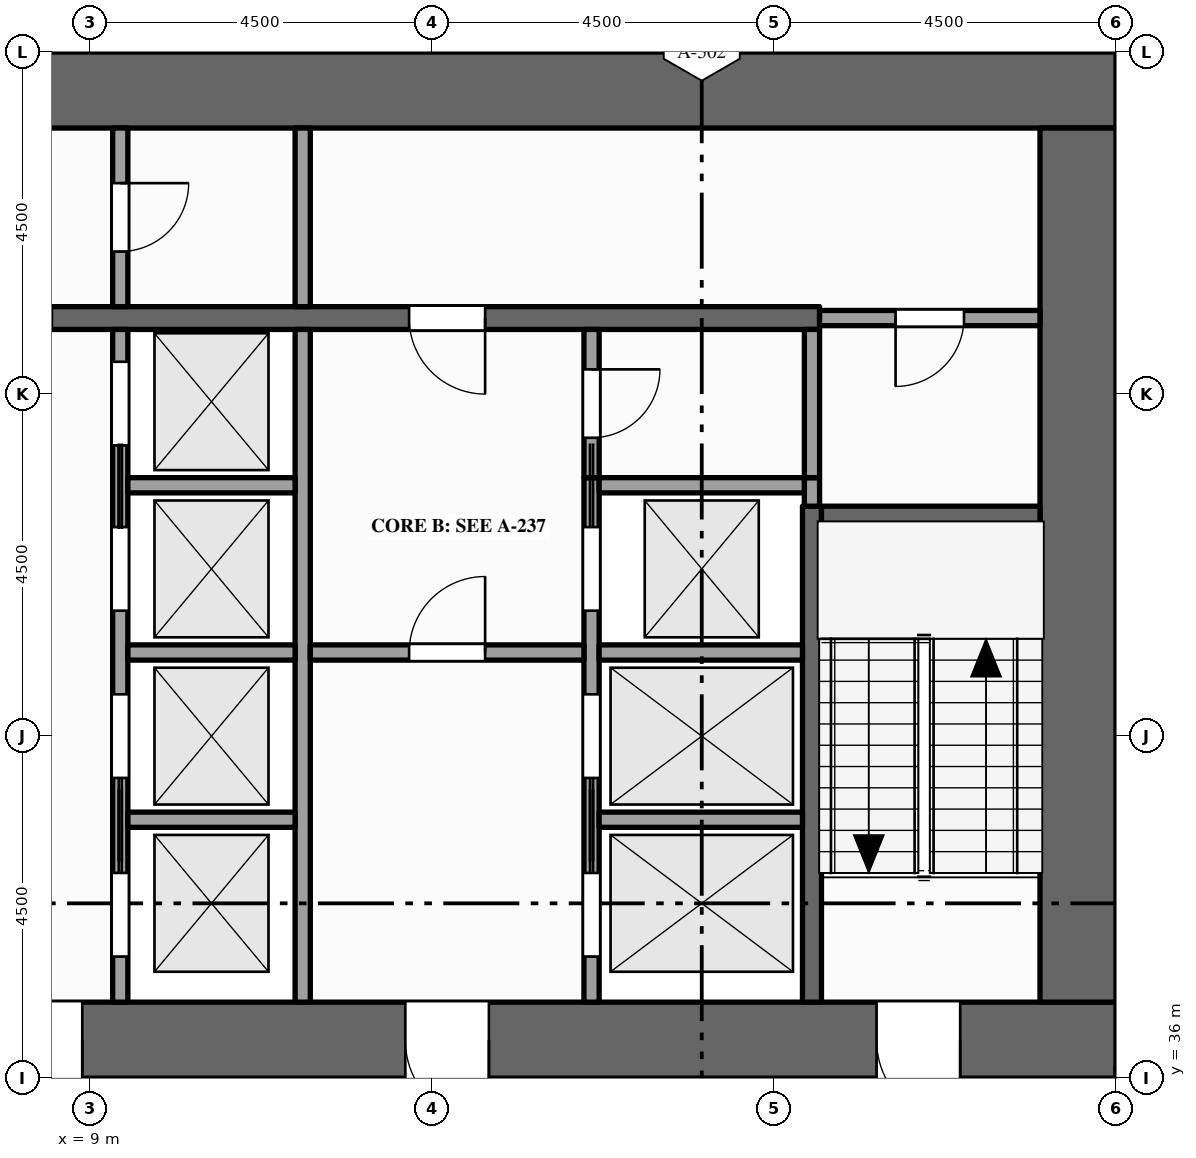
"""IFC4 building model, lengths in metres.
Left out: names, types, materials, properties, quantities, classifications, styles, units other than length and angle.
Written with IfcOpenShell. Run it as: python <this file> out.ifc"""

import sys

from ifc_helpers import new_model, si_unit, direction, frame, frame_2d, origin, place, context, subcontext, project, spatial, rectangle, extrude, element, fill, save


model = new_model("IFC4")
c1 = context("Model", 3, precision=1e-05, world=origin(), true_north=direction((0.0, 1.0)))
c2 = subcontext(c1, "Body", "Model", "MODEL_VIEW")
j1 = project(units=[si_unit("LENGTHUNIT", "METRE"), si_unit("PLANEANGLEUNIT", "RADIAN")], contexts=[c1])
p1 = place(None, origin())
s1 = spatial("IfcSite", under=j1, at=p1, CompositionType="ELEMENT")
p2 = place(p1, origin())
s2 = spatial("IfcBuilding", under=s1, at=p2, CompositionType="ELEMENT")
p3 = place(p2, frame((0.0, 0.0, 207.0)))
s3 = spatial("IfcBuildingStorey", under=s2, at=p3, CompositionType="ELEMENT", Elevation=207.0)
p4 = place(p3, frame((0.0, 36.5, -0.15), z_axis=(0.0, 0.0, 1.0), x_axis=(1.0, 0.0, 0.0)))
e1 = element("IfcWall", 1, at=p4, inside=s3, PredefinedType="SHEAR", context=c2, shape_type="SweptSolid", body=[
    extrude(rectangle(XDim=22.5, YDim=1.0, at=frame_2d((11.25, 0.0))), origin(), (0.0, 0.0, 1.0), 4.0),
])
p5 = place(p4, frame((7.1, 0.0, 0.15)))
e2 = element("IfcOpeningElement", 2, at=p5, cuts=e1, PredefinedType="OPENING", context=c2, shape_type="SweptSolid", body=[
    extrude(rectangle(XDim=1.8, YDim=2.1, at=frame_2d((0.9, 1.05))), frame((0.0, 0.51, 0.0), z_axis=(0.0, -1.0, 0.0), x_axis=(1.0, 0.0, 0.0)), (0.0, 0.0, 1.0), 1.02),
])
p6 = place(p4, frame((13.15, 0.0, 0.15)))
e3 = element("IfcOpeningElement", 3, at=p6, cuts=e1, PredefinedType="OPENING", context=c2, shape_type="SweptSolid", body=[
    extrude(rectangle(XDim=1.1, YDim=2.1, at=frame_2d((0.55, 1.05))), frame((0.0, 0.51, 0.0), z_axis=(0.0, -1.0, 0.0), x_axis=(1.0, 0.0, 0.0)), (0.0, 0.0, 1.0), 1.02),
])
p7 = place(p4, frame((2.15, 0.0, 0.15)))
e4 = element("IfcOpeningElement", 4, at=p7, cuts=e1, PredefinedType="OPENING", context=c2, shape_type="SweptSolid", body=[
    extrude(rectangle(XDim=1.1, YDim=2.1, at=frame_2d((0.55, 1.05))), frame((0.0, 0.51, 0.0), z_axis=(0.0, -1.0, 0.0), x_axis=(1.0, 0.0, 0.0)), (0.0, 0.0, 1.0), 1.02),
])
p8 = place(p4, frame((19.35, 0.0, 0.15)))
e5 = element("IfcOpeningElement", 5, at=p8, cuts=e1, PredefinedType="OPENING", context=c2, shape_type="SweptSolid", body=[
    extrude(rectangle(XDim=1.1, YDim=2.1, at=frame_2d((0.55, 1.05))), frame((0.0, 0.51, 0.0), z_axis=(0.0, -1.0, 0.0), x_axis=(1.0, 0.0, 0.0)), (0.0, 0.0, 1.0), 1.02),
])
p9 = place(p3, frame((0.0, 49.0, -0.15), z_axis=(0.0, 0.0, 1.0), x_axis=(1.0, 0.0, 0.0)))
e6 = element("IfcWall", 6, at=p9, inside=s3, PredefinedType="SHEAR", context=c2, shape_type="SweptSolid", body=[
    extrude(rectangle(XDim=22.5, YDim=1.0, at=frame_2d((11.25, 0.0))), origin(), (0.0, 0.0, 1.0), 4.0),
])
p10 = place(p3, frame((22.0, 37.0, -0.15), z_axis=(0.0, 0.0, 1.0), x_axis=(0.0, 1.0, 0.0)))
e7 = element("IfcWall", 7, at=p10, inside=s3, PredefinedType="SHEAR", context=c2, shape_type="SweptSolid", body=[
    extrude(rectangle(XDim=11.5, YDim=1.0, at=frame_2d((5.75, 0.0))), origin(), (0.0, 0.0, 1.0), 4.0),
])
p11 = place(p3, frame((9.4, 37.0, 0.0), z_axis=(0.0, 0.0, 1.0), x_axis=(0.0, 1.0, 0.0)))
e8 = element("IfcWall", 8, at=p11, inside=s3, PredefinedType="SOLIDWALL", context=c2, shape_type="SweptSolid", body=[
    extrude(rectangle(XDim=8.85, YDim=0.2, at=frame_2d((4.425, 0.0))), origin(), (0.0, 0.0, 1.0), 3.85),
])
p12 = place(p11, frame((0.6, 0.0, 0.012)))
e9 = element("IfcOpeningElement", 9, at=p12, cuts=e8, PredefinedType="OPENING", context=c2, shape_type="SweptSolid", body=[
    extrude(rectangle(XDim=1.1, YDim=2.1, at=frame_2d((0.55, 1.05))), frame((0.0, 0.11, 0.0), z_axis=(0.0, -1.0, 0.0), x_axis=(1.0, 0.0, 0.0)), (0.0, 0.0, 1.0), 0.22),
])
p13 = place(p11, frame((2.95, 0.0, 0.012)))
e10 = element("IfcOpeningElement", 10, at=p13, cuts=e8, PredefinedType="OPENING", context=c2, shape_type="SweptSolid", body=[
    extrude(rectangle(XDim=1.1, YDim=2.1, at=frame_2d((0.55, 1.05))), frame((0.0, 0.11, 0.0), z_axis=(0.0, -1.0, 0.0), x_axis=(1.0, 0.0, 0.0)), (0.0, 0.0, 1.0), 0.22),
])
p14 = place(p11, frame((5.15, 0.0, 0.012)))
e11 = element("IfcOpeningElement", 11, at=p14, cuts=e8, PredefinedType="OPENING", context=c2, shape_type="SweptSolid", body=[
    extrude(rectangle(XDim=1.1, YDim=2.1, at=frame_2d((0.55, 1.05))), frame((0.0, 0.11, 0.0), z_axis=(0.0, -1.0, 0.0), x_axis=(1.0, 0.0, 0.0)), (0.0, 0.0, 1.0), 0.22),
])
p15 = place(p11, frame((7.325, 0.0, 0.012)))
e12 = element("IfcOpeningElement", 12, at=p15, cuts=e8, PredefinedType="OPENING", context=c2, shape_type="SweptSolid", body=[
    extrude(rectangle(XDim=1.1, YDim=2.1, at=frame_2d((0.55, 1.05))), frame((0.0, 0.11, 0.0), z_axis=(0.0, -1.0, 0.0), x_axis=(1.0, 0.0, 0.0)), (0.0, 0.0, 1.0), 0.22),
])
p16 = place(p3, frame((9.4, 46.15, 0.0), z_axis=(0.0, 0.0, 1.0), x_axis=(0.0, 1.0, 0.0)))
e13 = element("IfcWall", 13, at=p16, inside=s3, PredefinedType="PARTITIONING", context=c2, shape_type="SweptSolid", body=[
    extrude(rectangle(XDim=2.35, YDim=0.2, at=frame_2d((1.175, 0.0))), origin(), (0.0, 0.0, 1.0), 3.85),
])
p17 = place(p16, frame((0.725, 0.0, 0.0)))
e14 = element("IfcOpeningElement", 14, at=p17, cuts=e13, PredefinedType="OPENING", context=c2, shape_type="SweptSolid", body=[
    extrude(rectangle(XDim=0.9, YDim=2.1, at=frame_2d((0.45, 1.05))), frame((0.0, 0.11, 0.0), z_axis=(0.0, -1.0, 0.0), x_axis=(1.0, 0.0, 0.0)), (0.0, 0.0, 1.0), 0.22),
])
p18 = place(p3, frame((11.8, 37.0, 0.0), z_axis=(0.0, 0.0, 1.0), x_axis=(0.0, 1.0, 0.0)))
e15 = element("IfcWall", 15, at=p18, inside=s3, PredefinedType="SOLIDWALL", context=c2, shape_type="SweptSolid", body=[
    extrude(rectangle(XDim=8.85, YDim=0.2, at=frame_2d((4.425, 0.0))), origin(), (0.0, 0.0, 1.0), 3.85),
])
p19 = place(p3, frame((11.8, 46.15, 0.0), z_axis=(0.0, 0.0, 1.0), x_axis=(0.0, 1.0, 0.0)))
e16 = element("IfcWall", 16, at=p19, inside=s3, PredefinedType="PARTITIONING", context=c2, shape_type="SweptSolid", body=[
    extrude(rectangle(XDim=2.35, YDim=0.2, at=frame_2d((1.175, 0.0))), origin(), (0.0, 0.0, 1.0), 3.85),
])
p20 = place(p3, frame((15.6, 37.0, 0.0), z_axis=(0.0, 0.0, 1.0), x_axis=(0.0, 1.0, 0.0)))
e17 = element("IfcWall", 17, at=p20, inside=s3, PredefinedType="SOLIDWALL", context=c2, shape_type="SweptSolid", body=[
    extrude(rectangle(XDim=6.9, YDim=0.2, at=frame_2d((3.45, 0.0))), origin(), (0.0, 0.0, 1.0), 3.85),
])
p21 = place(p20, frame((0.6, 0.0, 0.012)))
e18 = element("IfcOpeningElement", 18, at=p21, cuts=e17, PredefinedType="OPENING", context=c2, shape_type="SweptSolid", body=[
    extrude(rectangle(XDim=1.1, YDim=2.1, at=frame_2d((0.55, 1.05))), frame((0.0, 0.11, 0.0), z_axis=(0.0, -1.0, 0.0), x_axis=(1.0, 0.0, 0.0)), (0.0, 0.0, 1.0), 0.22),
])
p22 = place(p20, frame((2.95, 0.0, 0.012)))
e19 = element("IfcOpeningElement", 19, at=p22, cuts=e17, PredefinedType="OPENING", context=c2, shape_type="SweptSolid", body=[
    extrude(rectangle(XDim=1.1, YDim=2.1, at=frame_2d((0.55, 1.05))), frame((0.0, 0.11, 0.0), z_axis=(0.0, -1.0, 0.0), x_axis=(1.0, 0.0, 0.0)), (0.0, 0.0, 1.0), 0.22),
])
p23 = place(p20, frame((5.15, 0.0, 0.012)))
e20 = element("IfcOpeningElement", 20, at=p23, cuts=e17, PredefinedType="OPENING", context=c2, shape_type="SweptSolid", body=[
    extrude(rectangle(XDim=1.1, YDim=2.1, at=frame_2d((0.55, 1.05))), frame((0.0, 0.11, 0.0), z_axis=(0.0, -1.0, 0.0), x_axis=(1.0, 0.0, 0.0)), (0.0, 0.0, 1.0), 0.22),
])
p24 = place(p3, frame((15.6, 43.9, 0.0), z_axis=(0.0, 0.0, 1.0), x_axis=(0.0, 1.0, 0.0)))
e21 = element("IfcWall", 21, at=p24, inside=s3, PredefinedType="PARTITIONING", context=c2, shape_type="SweptSolid", body=[
    extrude(rectangle(XDim=1.95, YDim=0.2, at=frame_2d((0.975, 0.0))), origin(), (0.0, 0.0, 1.0), 3.85),
])
p25 = place(p24, frame((0.525, 0.0, 0.0)))
e22 = element("IfcOpeningElement", 22, at=p25, cuts=e21, PredefinedType="OPENING", context=c2, shape_type="SweptSolid", body=[
    extrude(rectangle(XDim=0.9, YDim=2.1, at=frame_2d((0.45, 1.05))), frame((0.0, 0.11, 0.0), z_axis=(0.0, -1.0, 0.0), x_axis=(1.0, 0.0, 0.0)), (0.0, 0.0, 1.0), 0.22),
])
p26 = place(p3, frame((18.5, 37.0, 0.0), z_axis=(0.0, 0.0, 1.0), x_axis=(0.0, 1.0, 0.0)))
e23 = element("IfcWall", 23, at=p26, inside=s3, PredefinedType="SHEAR", context=c2, shape_type="SweptSolid", body=[
    extrude(rectangle(XDim=6.525, YDim=0.25, at=frame_2d((3.262, 0.0))), origin(), (0.0, 0.0, 1.0), 3.85),
])
p27 = place(p3, frame((18.5, 43.525, 0.0), z_axis=(0.0, 0.0, 1.0), x_axis=(0.0, 1.0, 0.0)))
e24 = element("IfcWall", 24, at=p27, inside=s3, PredefinedType="SOLIDWALL", context=c2, shape_type="SweptSolid", body=[
    extrude(rectangle(XDim=0.375, YDim=0.2, at=frame_2d((0.188, 0.0))), origin(), (0.0, 0.0, 1.0), 3.85),
])
p28 = place(p3, frame((18.5, 43.9, 0.0), z_axis=(0.0, 0.0, 1.0), x_axis=(0.0, 1.0, 0.0)))
e25 = element("IfcWall", 25, at=p28, inside=s3, PredefinedType="PARTITIONING", context=c2, shape_type="SweptSolid", body=[
    extrude(rectangle(XDim=1.95, YDim=0.2, at=frame_2d((0.975, 0.0))), origin(), (0.0, 0.0, 1.0), 3.85),
])
p29 = place(p3, frame((9.5, 39.4, 0.0), z_axis=(0.0, 0.0, 1.0), x_axis=(1.0, 0.0, 0.0)))
e26 = element("IfcWall", 26, at=p29, inside=s3, PredefinedType="SOLIDWALL", context=c2, shape_type="SweptSolid", body=[
    extrude(rectangle(XDim=2.2, YDim=0.2, at=frame_2d((1.1, 0.0))), origin(), (0.0, 0.0, 1.0), 3.85),
])
p30 = place(p3, frame((15.7, 39.4, 0.0), z_axis=(0.0, 0.0, 1.0), x_axis=(1.0, 0.0, 0.0)))
e27 = element("IfcWall", 27, at=p30, inside=s3, PredefinedType="SOLIDWALL", context=c2, shape_type="SweptSolid", body=[
    extrude(rectangle(XDim=2.675, YDim=0.2, at=frame_2d((1.337, 0.0))), origin(), (0.0, 0.0, 1.0), 3.85),
])
p31 = place(p3, frame((9.5, 41.6, 0.0), z_axis=(0.0, 0.0, 1.0), x_axis=(1.0, 0.0, 0.0)))
e28 = element("IfcWall", 28, at=p31, inside=s3, PredefinedType="SOLIDWALL", context=c2, shape_type="SweptSolid", body=[
    extrude(rectangle(XDim=2.2, YDim=0.2, at=frame_2d((1.1, 0.0))), origin(), (0.0, 0.0, 1.0), 3.85),
])
p32 = place(p3, frame((11.9, 41.6, 0.0), z_axis=(0.0, 0.0, 1.0), x_axis=(1.0, 0.0, 0.0)))
e29 = element("IfcWall", 29, at=p32, inside=s3, PredefinedType="PARTITIONING", context=c2, shape_type="SweptSolid", body=[
    extrude(rectangle(XDim=3.6, YDim=0.2, at=frame_2d((1.8, 0.0))), origin(), (0.0, 0.0, 1.0), 3.85),
])
p33 = place(p32, frame((1.3, 0.0, 0.0)))
e30 = element("IfcOpeningElement", 30, at=p33, cuts=e29, PredefinedType="OPENING", context=c2, shape_type="SweptSolid", body=[
    extrude(rectangle(XDim=1.0, YDim=2.1, at=frame_2d((0.5, 1.05))), frame((0.0, 0.11, 0.0), z_axis=(0.0, -1.0, 0.0), x_axis=(1.0, 0.0, 0.0)), (0.0, 0.0, 1.0), 0.22),
])
p34 = place(p3, frame((15.7, 41.6, 0.0), z_axis=(0.0, 0.0, 1.0), x_axis=(1.0, 0.0, 0.0)))
e31 = element("IfcWall", 31, at=p34, inside=s3, PredefinedType="SOLIDWALL", context=c2, shape_type="SweptSolid", body=[
    extrude(rectangle(XDim=2.675, YDim=0.2, at=frame_2d((1.337, 0.0))), origin(), (0.0, 0.0, 1.0), 3.85),
])
p35 = place(p3, frame((18.625, 43.4, 0.0), z_axis=(0.0, 0.0, 1.0), x_axis=(1.0, 0.0, 0.0)))
e32 = element("IfcWall", 32, at=p35, inside=s3, PredefinedType="SHEAR", context=c2, shape_type="SweptSolid", body=[
    extrude(rectangle(XDim=2.875, YDim=0.25, at=frame_2d((1.438, 0.0))), origin(), (0.0, 0.0, 1.0), 3.85),
])
p36 = place(p3, frame((9.5, 43.8, 0.0), z_axis=(0.0, 0.0, 1.0), x_axis=(1.0, 0.0, 0.0)))
e33 = element("IfcWall", 33, at=p36, inside=s3, PredefinedType="SOLIDWALL", context=c2, shape_type="SweptSolid", body=[
    extrude(rectangle(XDim=2.2, YDim=0.2, at=frame_2d((1.1, 0.0))), origin(), (0.0, 0.0, 1.0), 3.85),
])
p37 = place(p3, frame((15.7, 43.8, 0.0), z_axis=(0.0, 0.0, 1.0), x_axis=(1.0, 0.0, 0.0)))
e34 = element("IfcWall", 34, at=p37, inside=s3, PredefinedType="SOLIDWALL", context=c2, shape_type="SweptSolid", body=[
    extrude(rectangle(XDim=2.7, YDim=0.2, at=frame_2d((1.35, 0.0))), origin(), (0.0, 0.0, 1.0), 3.85),
])
p38 = place(p3, frame((4.1, 46.0, 0.0), z_axis=(0.0, 0.0, 1.0), x_axis=(1.0, 0.0, 0.0)))
e35 = element("IfcWall", 35, at=p38, inside=s3, PredefinedType="SHEAR", context=c2, shape_type="SweptSolid", body=[
    extrude(rectangle(XDim=14.5, YDim=0.3, at=frame_2d((7.25, 0.0))), origin(), (0.0, 0.0, 1.0), 3.85),
])
p39 = place(p38, frame((3.4, 0.0, 0.0)))
e36 = element("IfcOpeningElement", 36, at=p39, cuts=e35, PredefinedType="OPENING", context=c2, shape_type="SweptSolid", body=[
    extrude(rectangle(XDim=1.0, YDim=2.1, at=frame_2d((0.5, 1.05))), frame((0.0, 0.16, 0.0), z_axis=(0.0, -1.0, 0.0), x_axis=(1.0, 0.0, 0.0)), (0.0, 0.0, 1.0), 0.32),
])
p40 = place(p38, frame((9.1, 0.0, 0.0)))
e37 = element("IfcOpeningElement", 37, at=p40, cuts=e35, PredefinedType="OPENING", context=c2, shape_type="SweptSolid", body=[
    extrude(rectangle(XDim=1.0, YDim=2.1, at=frame_2d((0.5, 1.05))), frame((0.0, 0.16, 0.0), z_axis=(0.0, -1.0, 0.0), x_axis=(1.0, 0.0, 0.0)), (0.0, 0.0, 1.0), 0.32),
])
p41 = place(p3, frame((18.6, 46.0, 0.0), z_axis=(0.0, 0.0, 1.0), x_axis=(1.0, 0.0, 0.0)))
e38 = element("IfcWall", 38, at=p41, inside=s3, PredefinedType="PARTITIONING", context=c2, shape_type="SweptSolid", body=[
    extrude(rectangle(XDim=2.9, YDim=0.2, at=frame_2d((1.45, 0.0))), origin(), (0.0, 0.0, 1.0), 3.85),
])
p42 = place(p41, frame((1.0, 0.0, 0.0)))
e39 = element("IfcOpeningElement", 39, at=p42, cuts=e38, PredefinedType="OPENING", context=c2, shape_type="SweptSolid", body=[
    extrude(rectangle(XDim=0.9, YDim=2.1, at=frame_2d((0.45, 1.05))), frame((0.0, 0.11, 0.0), z_axis=(0.0, -1.0, 0.0), x_axis=(1.0, 0.0, 0.0)), (0.0, 0.0, 1.0), 0.22),
])
p43 = place(p12, origin())
e40 = element("IfcDoor", 40, at=p43, inside=s3, OperationType="SLIDING_TO_RIGHT", PredefinedType="DOOR", context=c2, shape_type="SweptSolid", body=[
    extrude(rectangle(XDim=1.1, YDim=2.1, at=frame_2d((0.55, 1.05))), frame((0.0, 0.025, 0.0), z_axis=(0.0, -1.0, 0.0), x_axis=(1.0, 0.0, 0.0)), (0.0, 0.0, 1.0), 0.05),
])
fill(e9, e40)
p44 = place(p13, origin())
e41 = element("IfcDoor", 41, at=p44, inside=s3, OperationType="SLIDING_TO_LEFT", PredefinedType="DOOR", context=c2, shape_type="SweptSolid", body=[
    extrude(rectangle(XDim=1.1, YDim=2.1, at=frame_2d((0.55, 1.05))), frame((0.0, 0.025, 0.0), z_axis=(0.0, -1.0, 0.0), x_axis=(1.0, 0.0, 0.0)), (0.0, 0.0, 1.0), 0.05),
])
fill(e10, e41)
p45 = place(p14, origin())
e42 = element("IfcDoor", 42, at=p45, inside=s3, OperationType="SLIDING_TO_RIGHT", PredefinedType="DOOR", context=c2, shape_type="SweptSolid", body=[
    extrude(rectangle(XDim=1.1, YDim=2.1, at=frame_2d((0.55, 1.05))), frame((0.0, 0.025, 0.0), z_axis=(0.0, -1.0, 0.0), x_axis=(1.0, 0.0, 0.0)), (0.0, 0.0, 1.0), 0.05),
])
fill(e11, e42)
p46 = place(p15, origin())
e43 = element("IfcDoor", 43, at=p46, inside=s3, OperationType="SLIDING_TO_LEFT", PredefinedType="DOOR", context=c2, shape_type="SweptSolid", body=[
    extrude(rectangle(XDim=1.1, YDim=2.1, at=frame_2d((0.55, 1.05))), frame((0.0, 0.025, 0.0), z_axis=(0.0, -1.0, 0.0), x_axis=(1.0, 0.0, 0.0)), (0.0, 0.0, 1.0), 0.05),
])
fill(e12, e43)
p47 = place(p21, origin())
e44 = element("IfcDoor", 44, at=p47, inside=s3, OperationType="SLIDING_TO_RIGHT", PredefinedType="DOOR", context=c2, shape_type="SweptSolid", body=[
    extrude(rectangle(XDim=1.1, YDim=2.1, at=frame_2d((0.55, 1.05))), frame((0.0, 0.025, 0.0), z_axis=(0.0, -1.0, 0.0), x_axis=(1.0, 0.0, 0.0)), (0.0, 0.0, 1.0), 0.05),
])
fill(e18, e44)
p48 = place(p22, origin())
e45 = element("IfcDoor", 45, at=p48, inside=s3, OperationType="SLIDING_TO_LEFT", PredefinedType="DOOR", context=c2, shape_type="SweptSolid", body=[
    extrude(rectangle(XDim=1.1, YDim=2.1, at=frame_2d((0.55, 1.05))), frame((0.0, 0.025, 0.0), z_axis=(0.0, -1.0, 0.0), x_axis=(1.0, 0.0, 0.0)), (0.0, 0.0, 1.0), 0.05),
])
fill(e19, e45)
p49 = place(p23, origin())
e46 = element("IfcDoor", 46, at=p49, inside=s3, OperationType="SLIDING_TO_RIGHT", PredefinedType="DOOR", context=c2, shape_type="SweptSolid", body=[
    extrude(rectangle(XDim=1.1, YDim=2.1, at=frame_2d((0.55, 1.05))), frame((0.0, 0.025, 0.0), z_axis=(0.0, -1.0, 0.0), x_axis=(1.0, 0.0, 0.0)), (0.0, 0.0, 1.0), 0.05),
])
fill(e20, e46)
p50 = place(p5, origin())
e47 = element("IfcDoor", 47, at=p50, inside=s3, OperationType="DOUBLE_DOOR_SINGLE_SWING", PredefinedType="DOOR", context=c2, shape_type="SweptSolid", body=[
    extrude(rectangle(XDim=1.8, YDim=2.1, at=frame_2d((0.9, 1.05))), frame((0.0, 0.025, 0.0), z_axis=(0.0, -1.0, 0.0), x_axis=(1.0, 0.0, 0.0)), (0.0, 0.0, 1.0), 0.05),
])
fill(e2, e47)
p51 = place(p6, origin())
e48 = element("IfcDoor", 48, at=p51, inside=s3, OperationType="SINGLE_SWING_RIGHT", PredefinedType="DOOR", context=c2, shape_type="SweptSolid", body=[
    extrude(rectangle(XDim=1.1, YDim=2.1, at=frame_2d((0.55, 1.05))), frame((0.0, 0.025, 0.0), z_axis=(0.0, -1.0, 0.0), x_axis=(1.0, 0.0, 0.0)), (0.0, 0.0, 1.0), 0.05),
])
fill(e3, e48)
p52 = place(p33, origin())
e49 = element("IfcDoor", 49, at=p52, inside=s3, OperationType="SINGLE_SWING_RIGHT", PredefinedType="DOOR", context=c2, shape_type="SweptSolid", body=[
    extrude(rectangle(XDim=1.0, YDim=2.1, at=frame_2d((0.5, 1.05))), frame((0.0, 0.025, 0.0), z_axis=(0.0, -1.0, 0.0), x_axis=(1.0, 0.0, 0.0)), (0.0, 0.0, 1.0), 0.05),
])
fill(e30, e49)
p53 = place(p40, origin())
e50 = element("IfcDoor", 50, at=p53, inside=s3, OperationType="SINGLE_SWING_RIGHT", PredefinedType="DOOR", context=c2, shape_type="SweptSolid", body=[
    extrude(rectangle(XDim=1.0, YDim=2.1, at=frame_2d((0.5, 1.05))), frame((0.0, 0.025, 0.0), z_axis=(0.0, -1.0, 0.0), x_axis=(1.0, 0.0, 0.0)), (0.0, 0.0, 1.0), 0.05),
])
fill(e37, e50)
p54 = place(p17, origin())
e51 = element("IfcDoor", 51, at=p54, inside=s3, OperationType="SINGLE_SWING_RIGHT", PredefinedType="DOOR", context=c2, shape_type="SweptSolid", body=[
    extrude(rectangle(XDim=0.9, YDim=2.1, at=frame_2d((0.45, 1.05))), frame((0.0, 0.025, 0.0), z_axis=(0.0, -1.0, 0.0), x_axis=(1.0, 0.0, 0.0)), (0.0, 0.0, 1.0), 0.05),
])
fill(e14, e51)
p55 = place(p8, origin())
e52 = element("IfcDoor", 52, at=p55, inside=s3, OperationType="SINGLE_SWING_RIGHT", PredefinedType="DOOR", context=c2, shape_type="SweptSolid", body=[
    extrude(rectangle(XDim=1.1, YDim=2.1, at=frame_2d((0.55, 1.05))), frame((0.0, 0.025, 0.0), z_axis=(0.0, -1.0, 0.0), x_axis=(1.0, 0.0, 0.0)), (0.0, 0.0, 1.0), 0.05),
])
fill(e5, e52)
p56 = place(p42, origin())
e53 = element("IfcDoor", 53, at=p56, inside=s3, OperationType="SINGLE_SWING_LEFT", PredefinedType="DOOR", context=c2, shape_type="SweptSolid", body=[
    extrude(rectangle(XDim=0.9, YDim=2.1, at=frame_2d((0.45, 1.05))), frame((0.0, 0.025, 0.0), z_axis=(0.0, -1.0, 0.0), x_axis=(1.0, 0.0, 0.0)), (0.0, 0.0, 1.0), 0.05),
])
fill(e39, e53)
p57 = place(p25, origin())
e54 = element("IfcDoor", 54, at=p57, inside=s3, OperationType="SINGLE_SWING_RIGHT", PredefinedType="DOOR", context=c2, shape_type="SweptSolid", body=[
    extrude(rectangle(XDim=0.9, YDim=2.1, at=frame_2d((0.45, 1.05))), frame((0.0, 0.025, 0.0), z_axis=(0.0, -1.0, 0.0), x_axis=(1.0, 0.0, 0.0)), (0.0, 0.0, 1.0), 0.05),
])
fill(e22, e54)
save(model, sys.argv[1])
